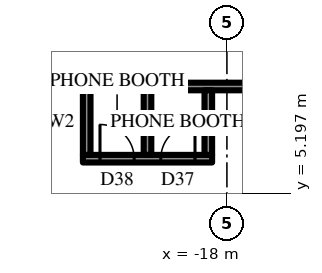
"""IFC4 building model, lengths in metres.
Left out: names, types, materials, properties, quantities, classifications, styles, units other than length and angle.
Written with IfcOpenShell. Run it as: python <this file> out.ifc"""

import sys

from ifc_helpers import new_model, si_unit, direction, frame, frame_2d, origin, place, context, subcontext, project, spatial, rectangle, extrude, element, fill, save


model = new_model("IFC4")
c1 = context("Model", 3, precision=1e-05, world=origin(), true_north=direction((0.0, 1.0)))
c2 = subcontext(c1, "Body", "Model", "MODEL_VIEW")
j1 = project(units=[si_unit("LENGTHUNIT", "METRE"), si_unit("PLANEANGLEUNIT", "RADIAN")], contexts=[c1])
p1 = place(None, origin())
s1 = spatial("IfcSite", under=j1, at=p1, CompositionType="ELEMENT")
p2 = place(p1, origin())
s2 = spatial("IfcBuilding", under=s1, at=p2, CompositionType="ELEMENT")
p3 = place(p2, frame((0.0, 0.0, 244.9)))
s3 = spatial("IfcBuildingStorey", under=s2, at=p3, CompositionType="ELEMENT", Elevation=244.9)
p4 = place(p3, frame((-15.5, 8.0, 0.0), z_axis=(0.0, 0.0, 1.0), x_axis=(-1.0, 0.0, 0.0)))
e1 = element("IfcWall", 1, at=p4, inside=s3, PredefinedType="PARTITIONING", context=c2, shape_type="SweptSolid", body=[
    extrude(rectangle(XDim=13.113, YDim=0.2, at=frame_2d((6.557, 0.0))), origin(), (0.0, 0.0, 1.0), 4.0),
])
p5 = place(p4, frame((0.811, 0.0, 0.0)))
e2 = element("IfcOpeningElement", 2, at=p5, cuts=e1, PredefinedType="OPENING", context=c2, shape_type="SweptSolid", body=[
    extrude(rectangle(XDim=1.0, YDim=2.2, at=frame_2d((0.5, 1.1))), frame((0.0, 0.11, 0.0), z_axis=(0.0, -1.0, 0.0), x_axis=(1.0, 0.0, 0.0)), (0.0, 0.0, 1.0), 0.22),
])
p6 = place(p3, frame((-18.39, 6.1, 0.0), z_axis=(0.0, 0.0, 1.0), x_axis=(-1.0, 0.0, 0.0)))
e3 = element("IfcWall", 3, at=p6, inside=s3, PredefinedType="PARTITIONING", context=c2, shape_type="SweptSolid", body=[
    extrude(rectangle(XDim=3.4, YDim=0.2, at=frame_2d((1.7, 0.0))), origin(), (0.0, 0.0, 1.0), 4.0),
])
p7 = place(p6, frame((0.45, 0.0, 0.0)))
e4 = element("IfcOpeningElement", 4, at=p7, cuts=e3, PredefinedType="OPENING", context=c2, shape_type="SweptSolid", body=[
    extrude(rectangle(XDim=0.9, YDim=2.2, at=frame_2d((0.45, 1.1))), frame((0.0, 0.11, 0.0), z_axis=(0.0, -1.0, 0.0), x_axis=(1.0, 0.0, 0.0)), (0.0, 0.0, 1.0), 0.22),
])
p8 = place(p6, frame((2.05, 0.0, 0.0)))
e5 = element("IfcOpeningElement", 5, at=p8, cuts=e3, PredefinedType="OPENING", context=c2, shape_type="SweptSolid", body=[
    extrude(rectangle(XDim=0.9, YDim=2.2, at=frame_2d((0.45, 1.1))), frame((0.0, 0.11, 0.0), z_axis=(0.0, -1.0, 0.0), x_axis=(1.0, 0.0, 0.0)), (0.0, 0.0, 1.0), 0.22),
])
for number, where, z_axis, x_axis in (
    (6, (-18.49, 7.9, 0.0), (0.0, 0.0, 1.0), (0.0, -1.0, 0.0)),
    (7, (-20.09, 7.9, 0.0), (0.0, 0.0, 1.0), (0.0, -1.0, 0.0)),
    (8, (-21.69, 7.9, 0.0), (0.0, 0.0, 1.0), (0.0, -1.0, 0.0)),
):
    element("IfcWall", number, at=place(p3, frame(where, z_axis=z_axis, x_axis=x_axis)), inside=s3, PredefinedType="PARTITIONING", context=c2, shape_type="SweptSolid", body=[
        extrude(rectangle(XDim=1.7, YDim=0.2, at=frame_2d((0.85, 0.0))), origin(), (0.0, 0.0, 1.0), 4.0),
    ])
p9 = place(p7, frame((0.9, 0.0, 0.0), z_axis=(0.0, 0.0, 1.0), x_axis=(-1.0, 0.0, 0.0)))
e9 = element("IfcDoor", 9, at=p9, inside=s3, OperationType="SINGLE_SWING_LEFT", PredefinedType="DOOR", context=c2, shape_type="SweptSolid", body=[
    extrude(rectangle(XDim=0.9, YDim=2.2, at=frame_2d((0.45, 1.1))), frame((0.0, 0.025, 0.0), z_axis=(0.0, -1.0, 0.0), x_axis=(1.0, 0.0, 0.0)), (0.0, 0.0, 1.0), 0.05),
])
fill(e4, e9)
p10 = place(p8, frame((0.9, 0.0, 0.0), z_axis=(0.0, 0.0, 1.0), x_axis=(-1.0, 0.0, 0.0)))
e10 = element("IfcDoor", 10, at=p10, inside=s3, OperationType="SINGLE_SWING_RIGHT", PredefinedType="DOOR", context=c2, shape_type="SweptSolid", body=[
    extrude(rectangle(XDim=0.9, YDim=2.2, at=frame_2d((0.45, 1.1))), frame((0.0, 0.025, 0.0), z_axis=(0.0, -1.0, 0.0), x_axis=(1.0, 0.0, 0.0)), (0.0, 0.0, 1.0), 0.05),
])
fill(e5, e10)
save(model, sys.argv[1])
